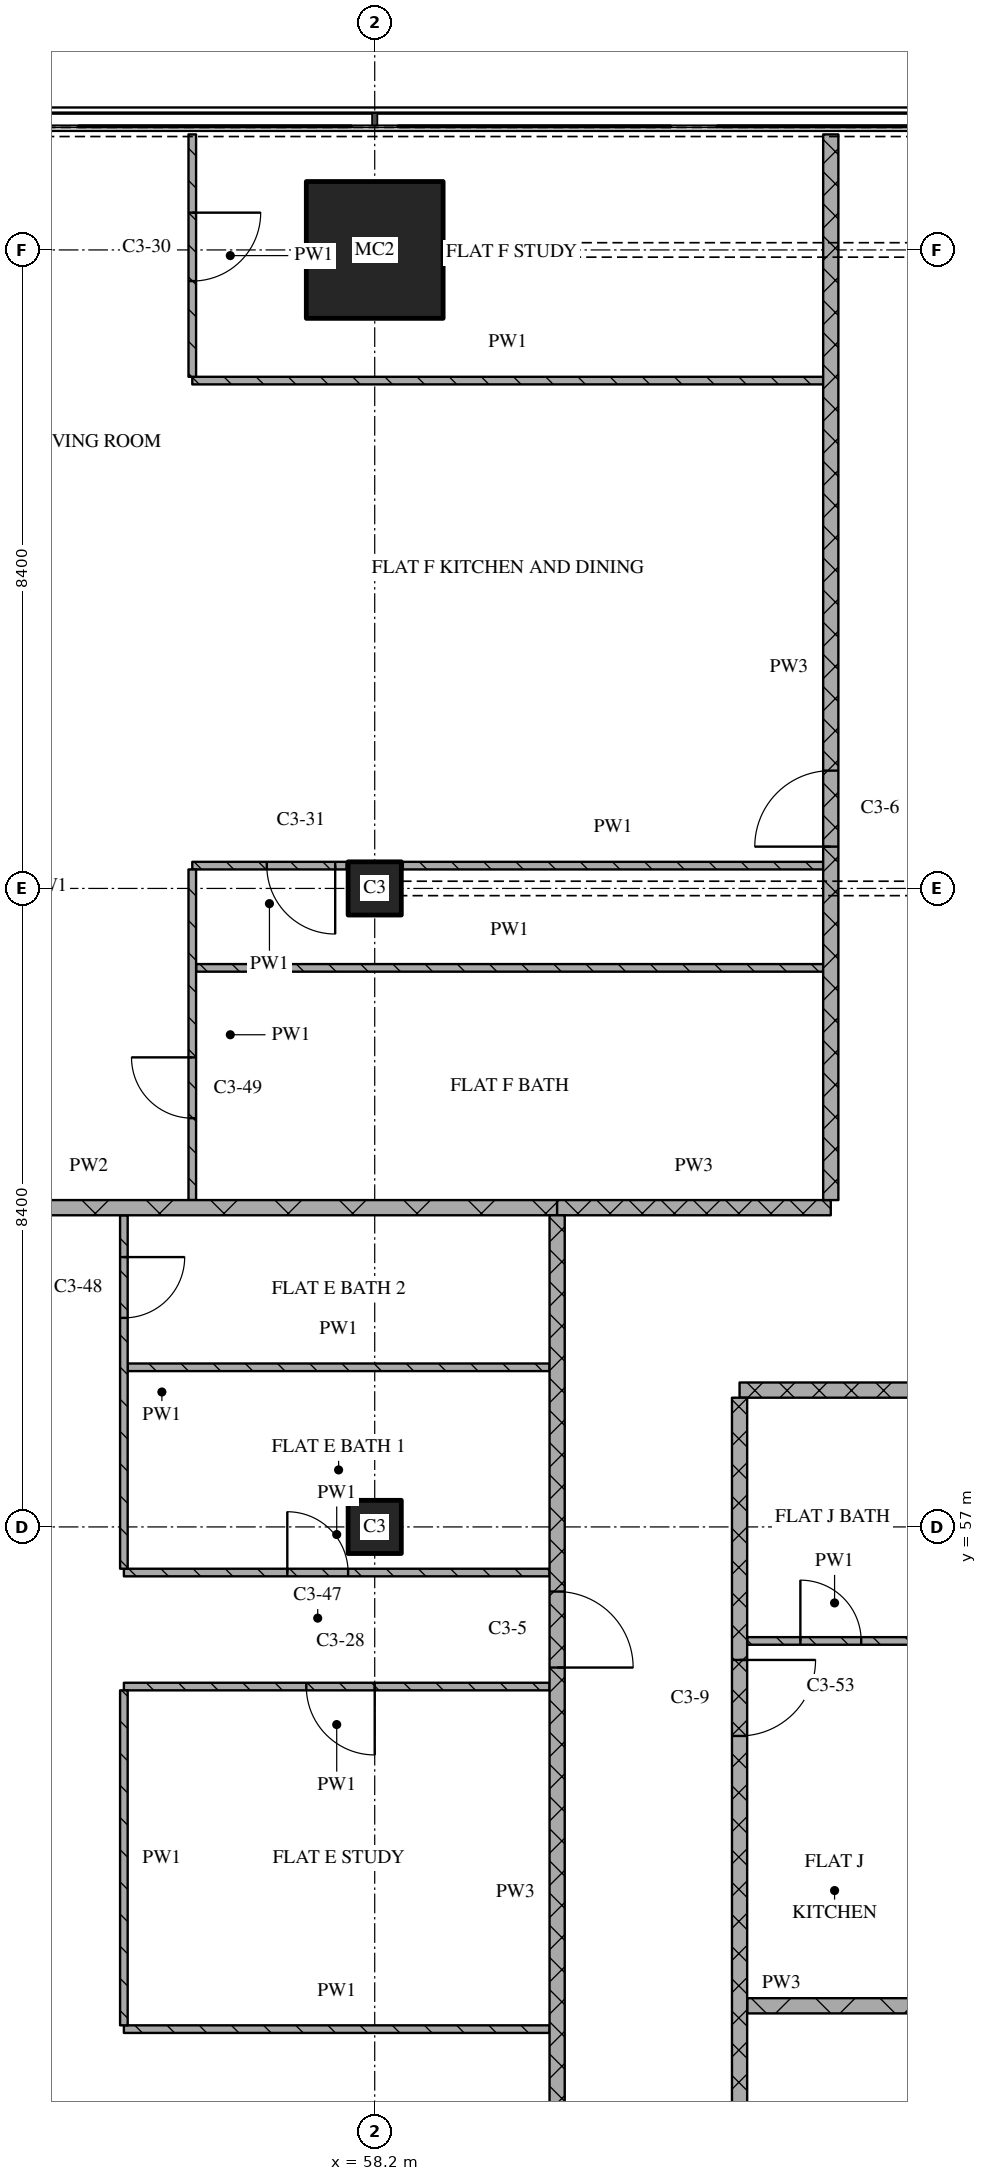
"""IFC4 building model, lengths in metres.
Left out: names, types, materials, properties, quantities, classifications, styles, units other than length and angle.
Written with IfcOpenShell. Run it as: python <this file> out.ifc"""

import sys

from ifc_helpers import new_model, si_unit, direction, frame, frame_2d, origin, origin_2d, place, context, subcontext, project, spatial, rectangle, extrude, element, fill, save


model = new_model("IFC4")
c1 = context("Model", 3, precision=1e-05, world=origin(), true_north=direction((0.0, 1.0)))
c2 = subcontext(c1, "Body", "Model", "MODEL_VIEW")
j1 = project(units=[si_unit("LENGTHUNIT", "METRE"), si_unit("PLANEANGLEUNIT", "RADIAN")], contexts=[c1])
p1 = place(None, origin())
s1 = spatial("IfcSite", under=j1, at=p1, CompositionType="ELEMENT")
p2 = place(p1, origin())
s2 = spatial("IfcBuilding", under=s1, at=p2, CompositionType="ELEMENT")
p3 = place(p2, frame((0.0, 0.0, 169.05)))
s3 = spatial("IfcBuildingStorey", under=s2, at=p3, CompositionType="ELEMENT", Elevation=169.05)
for number, where, z_axis, x_axis in (
    (1, (58.2, 57.0, 0.0), (0.0, 0.0, 1.0), (1.0, 0.0, 0.0)),
    (2, (58.2, 65.4, 0.0), (0.0, 0.0, 1.0), (1.0, 0.0, 0.0)),
):
    element("IfcColumn", number, at=place(p3, frame(where, z_axis=z_axis, x_axis=x_axis)), inside=s3, PredefinedType="COLUMN", context=c2, shape_type="SweptSolid", body=[
        extrude(rectangle(XDim=0.7, YDim=0.7, at=origin_2d()), origin(), (0.0, 0.0, 1.0), 3.6),
    ])
p4 = place(p3, frame((58.2, 73.8, 0.0), z_axis=(0.0, 0.0, 1.0), x_axis=(1.0, 0.0, 0.0)))
e3 = element("IfcColumn", 3, at=p4, inside=s3, PredefinedType="COLUMN", context=c2, shape_type="SweptSolid", body=[
    extrude(rectangle(XDim=1.8, YDim=1.8, at=origin_2d()), origin(), (0.0, 0.0, 1.0), 3.6),
])
p5 = place(p3, frame((54.9, 50.393, 0.0), z_axis=(0.0, 0.0, 1.0), x_axis=(1.0, 0.0, 0.0)))
e4 = element("IfcWall", 4, at=p5, inside=s3, PredefinedType="PARTITIONING", context=c2, shape_type="SweptSolid", body=[
    extrude(rectangle(XDim=5.6, YDim=0.1, at=frame_2d((2.8, 0.0))), origin(), (0.0, 0.0, 1.0), 3.32),
])
p6 = place(p3, frame((63.1, 50.7, 0.0), z_axis=(0.0, 0.0, 1.0), x_axis=(1.0, 0.0, 0.0)))
e5 = element("IfcWall", 5, at=p6, inside=s3, PredefinedType="PARTITIONING", context=c2, shape_type="SweptSolid", body=[
    extrude(rectangle(XDim=5.1, YDim=0.2, at=frame_2d((2.55, 0.0))), origin(), (0.0, 0.0, 1.0), 3.32),
])
p7 = place(p3, frame((60.5, 54.9, 0.0), z_axis=(0.0, 0.0, 1.0), x_axis=(-1.0, 0.0, 0.0)))
e6 = element("IfcWall", 6, at=p7, inside=s3, PredefinedType="PARTITIONING", context=c2, shape_type="SweptSolid", body=[
    extrude(rectangle(XDim=5.6, YDim=0.1, at=frame_2d((2.8, 0.0))), origin(), (0.0, 0.0, 1.0), 3.32),
])
p8 = place(p7, frame((2.3, 0.0, 0.0)))
e7 = element("IfcOpeningElement", 7, at=p8, cuts=e6, PredefinedType="OPENING", context=c2, shape_type="SweptSolid", body=[
    extrude(rectangle(XDim=0.9, YDim=2.1, at=frame_2d((0.45, 1.05))), frame((0.0, 0.06, 0.0), z_axis=(0.0, -1.0, 0.0), x_axis=(1.0, 0.0, 0.0)), (0.0, 0.0, 1.0), 0.12),
])
p9 = place(p3, frame((63.1, 55.5, 0.0), z_axis=(0.0, 0.0, 1.0), x_axis=(1.0, 0.0, 0.0)))
e8 = element("IfcWall", 8, at=p9, inside=s3, PredefinedType="PARTITIONING", context=c2, shape_type="SweptSolid", body=[
    extrude(rectangle(XDim=2.3, YDim=0.1, at=frame_2d((1.15, 0.0))), origin(), (0.0, 0.0, 1.0), 3.32),
])
p10 = place(p9, frame((0.7, 0.0, 0.0)))
e9 = element("IfcOpeningElement", 9, at=p10, cuts=e8, PredefinedType="OPENING", context=c2, shape_type="SweptSolid", body=[
    extrude(rectangle(XDim=0.8, YDim=2.1, at=frame_2d((0.4, 1.05))), frame((0.0, 0.06, 0.0), z_axis=(0.0, -1.0, 0.0), x_axis=(1.0, 0.0, 0.0)), (0.0, 0.0, 1.0), 0.12),
])
p11 = place(p3, frame((54.9, 56.4, 0.0), z_axis=(0.0, 0.0, 1.0), x_axis=(1.0, 0.0, 0.0)))
e10 = element("IfcWall", 10, at=p11, inside=s3, PredefinedType="PARTITIONING", context=c2, shape_type="SweptSolid", body=[
    extrude(rectangle(XDim=5.6, YDim=0.1, at=frame_2d((2.8, 0.0))), origin(), (0.0, 0.0, 1.0), 3.32),
])
p12 = place(p11, frame((2.15, 0.0, 0.0)))
e11 = element("IfcOpeningElement", 11, at=p12, cuts=e10, PredefinedType="OPENING", context=c2, shape_type="SweptSolid", body=[
    extrude(rectangle(XDim=0.8, YDim=2.1, at=frame_2d((0.4, 1.05))), frame((0.0, 0.06, 0.0), z_axis=(0.0, -1.0, 0.0), x_axis=(1.0, 0.0, 0.0)), (0.0, 0.0, 1.0), 0.12),
])
p13 = place(p3, frame((63.0, 58.8, 0.0), z_axis=(0.0, 0.0, 1.0), x_axis=(1.0, 0.0, 0.0)))
e12 = element("IfcWall", 12, at=p13, inside=s3, PredefinedType="PARTITIONING", context=c2, shape_type="SweptSolid", body=[
    extrude(rectangle(XDim=10.8, YDim=0.2, at=frame_2d((5.4, 0.0))), origin(), (0.0, 0.0, 1.0), 3.32),
])
p14 = place(p3, frame((54.95, 59.1, 0.0), z_axis=(0.0, 0.0, 1.0), x_axis=(1.0, 0.0, 0.0)))
e13 = element("IfcWall", 13, at=p14, inside=s3, PredefinedType="PARTITIONING", context=c2, shape_type="SweptSolid", body=[
    extrude(rectangle(XDim=5.55, YDim=0.1, at=frame_2d((2.775, 0.0))), origin(), (0.0, 0.0, 1.0), 3.32),
])
p15 = place(p3, frame((60.6, 61.2, 0.0), z_axis=(0.0, 0.0, 1.0), x_axis=(1.0, 0.0, 0.0)))
e14 = element("IfcWall", 14, at=p15, inside=s3, PredefinedType="PARTITIONING", context=c2, shape_type="SweptSolid", body=[
    extrude(rectangle(XDim=3.6, YDim=0.2, at=frame_2d((1.8, 0.0))), origin(), (0.0, 0.0, 1.0), 3.32),
])
p16 = place(p3, frame((48.28, 61.2, 0.0), z_axis=(0.0, 0.0, 1.0), x_axis=(1.0, 0.0, 0.0)))
e15 = element("IfcWall", 15, at=p16, inside=s3, PredefinedType="PARTITIONING", context=c2, shape_type="SweptSolid", body=[
    extrude(rectangle(XDim=12.32, YDim=0.2, at=frame_2d((6.16, 0.0))), origin(), (0.0, 0.0, 1.0), 3.32),
])
p17 = place(p3, frame((55.85, 64.355, 0.0), z_axis=(0.0, 0.0, 1.0), x_axis=(1.0, 0.0, 0.0)))
e16 = element("IfcWall", 16, at=p17, inside=s3, PredefinedType="PARTITIONING", context=c2, shape_type="SweptSolid", body=[
    extrude(rectangle(XDim=8.25, YDim=0.1, at=frame_2d((4.125, 0.0))), origin(), (0.0, 0.0, 1.0), 3.32),
])
p18 = place(p3, frame((57.83, 65.7, 0.0), z_axis=(0.0, 0.0, 1.0), x_axis=(-1.0, 0.0, 0.0)))
e17 = element("IfcWall", 17, at=p18, inside=s3, PredefinedType="PARTITIONING", context=c2, shape_type="SweptSolid", body=[
    extrude(rectangle(XDim=2.03, YDim=0.1, at=frame_2d((1.015, 0.0))), origin(), (0.0, 0.0, 1.0), 3.32),
])
p19 = place(p18, frame((0.15, 0.0, 0.0)))
e18 = element("IfcOpeningElement", 18, at=p19, cuts=e17, PredefinedType="OPENING", context=c2, shape_type="SweptSolid", body=[
    extrude(rectangle(XDim=0.9, YDim=2.1, at=frame_2d((0.45, 1.05))), frame((0.0, 0.06, 0.0), z_axis=(0.0, -1.0, 0.0), x_axis=(1.0, 0.0, 0.0)), (0.0, 0.0, 1.0), 0.12),
])
p20 = place(p3, frame((58.57, 65.7, 0.0), z_axis=(0.0, 0.0, 1.0), x_axis=(1.0, 0.0, 0.0)))
e19 = element("IfcWall", 19, at=p20, inside=s3, PredefinedType="PARTITIONING", context=c2, shape_type="SweptSolid", body=[
    extrude(rectangle(XDim=5.53, YDim=0.1, at=frame_2d((2.765, 0.0))), origin(), (0.0, 0.0, 1.0), 3.32),
])
p21 = place(p3, frame((55.8, 72.081, 0.0), z_axis=(0.0, 0.0, 1.0), x_axis=(1.0, 0.0, 0.0)))
e20 = element("IfcWall", 20, at=p21, inside=s3, PredefinedType="PARTITIONING", context=c2, shape_type="SweptSolid", body=[
    extrude(rectangle(XDim=8.3, YDim=0.1, at=frame_2d((4.15, 0.0))), origin(), (0.0, 0.0, 1.0), 3.32),
])
p22 = place(p3, frame((54.9, 54.85, 0.0), z_axis=(0.0, 0.0, 1.0), x_axis=(0.0, -1.0, 0.0)))
e21 = element("IfcWall", 21, at=p22, inside=s3, PredefinedType="PARTITIONING", context=c2, shape_type="SweptSolid", body=[
    extrude(rectangle(XDim=4.407, YDim=0.1, at=frame_2d((2.204, 0.0))), origin(), (0.0, 0.0, 1.0), 3.32),
])
p23 = place(p3, frame((54.9, 61.1, 0.0), z_axis=(0.0, 0.0, 1.0), x_axis=(0.0, -1.0, 0.0)))
e22 = element("IfcWall", 22, at=p23, inside=s3, PredefinedType="PARTITIONING", context=c2, shape_type="SweptSolid", body=[
    extrude(rectangle(XDim=4.65, YDim=0.1, at=frame_2d((2.325, 0.0))), origin(), (0.0, 0.0, 1.0), 3.32),
])
p24 = place(p23, frame((0.55, 0.0, 0.0)))
e23 = element("IfcOpeningElement", 23, at=p24, cuts=e22, PredefinedType="OPENING", context=c2, shape_type="SweptSolid", body=[
    extrude(rectangle(XDim=0.8, YDim=2.1, at=frame_2d((0.4, 1.05))), frame((0.0, 0.06, 0.0), z_axis=(0.0, -1.0, 0.0), x_axis=(1.0, 0.0, 0.0)), (0.0, 0.0, 1.0), 0.12),
])
p25 = place(p3, frame((55.8, 65.65, 0.0), z_axis=(0.0, 0.0, 1.0), x_axis=(0.0, -1.0, 0.0)))
e24 = element("IfcWall", 24, at=p25, inside=s3, PredefinedType="PARTITIONING", context=c2, shape_type="SweptSolid", body=[
    extrude(rectangle(XDim=4.35, YDim=0.1, at=frame_2d((2.175, 0.0))), origin(), (0.0, 0.0, 1.0), 3.32),
])
p26 = place(p25, frame((2.473, 0.0, 0.0)))
e25 = element("IfcOpeningElement", 25, at=p26, cuts=e24, PredefinedType="OPENING", context=c2, shape_type="SweptSolid", body=[
    extrude(rectangle(XDim=0.8, YDim=2.1, at=frame_2d((0.4, 1.05))), frame((0.0, 0.06, 0.0), z_axis=(0.0, -1.0, 0.0), x_axis=(1.0, 0.0, 0.0)), (0.0, 0.0, 1.0), 0.12),
])
p27 = place(p3, frame((55.8, 75.32, 0.0), z_axis=(0.0, 0.0, 1.0), x_axis=(0.0, -1.0, 0.0)))
e26 = element("IfcWall", 26, at=p27, inside=s3, PredefinedType="PARTITIONING", context=c2, shape_type="SweptSolid", body=[
    extrude(rectangle(XDim=3.189, YDim=0.1, at=frame_2d((1.594, 0.0))), origin(), (0.0, 0.0, 1.0), 3.32),
])
p28 = place(p27, frame((1.03, 0.0, 0.0)))
e27 = element("IfcOpeningElement", 27, at=p28, cuts=e26, PredefinedType="OPENING", context=c2, shape_type="SweptSolid", body=[
    extrude(rectangle(XDim=0.9, YDim=2.1, at=frame_2d((0.45, 1.05))), frame((0.0, 0.06, 0.0), z_axis=(0.0, -1.0, 0.0), x_axis=(1.0, 0.0, 0.0)), (0.0, 0.0, 1.0), 0.12),
])
p29 = place(p3, frame((60.6, 43.3, 0.0), z_axis=(0.0, 0.0, 1.0), x_axis=(0.0, 1.0, 0.0)))
e28 = element("IfcWall", 28, at=p29, inside=s3, PredefinedType="PARTITIONING", context=c2, shape_type="SweptSolid", body=[
    extrude(rectangle(XDim=17.8, YDim=0.2, at=frame_2d((8.9, 0.0))), origin(), (0.0, 0.0, 1.0), 3.32),
])
p30 = place(p29, frame((11.85, 0.0, 0.0)))
e29 = element("IfcOpeningElement", 29, at=p30, cuts=e28, PredefinedType="OPENING", context=c2, shape_type="SweptSolid", body=[
    extrude(rectangle(XDim=1.0, YDim=2.1, at=frame_2d((0.5, 1.05))), frame((0.0, 0.11, 0.0), z_axis=(0.0, -1.0, 0.0), x_axis=(1.0, 0.0, 0.0)), (0.0, 0.0, 1.0), 0.22),
])
p31 = place(p3, frame((63.0, 58.7, 0.0), z_axis=(0.0, 0.0, 1.0), x_axis=(0.0, -1.0, 0.0)))
e30 = element("IfcWall", 30, at=p31, inside=s3, PredefinedType="PARTITIONING", context=c2, shape_type="SweptSolid", body=[
    extrude(rectangle(XDim=15.4, YDim=0.2, at=frame_2d((7.7, 0.0))), origin(), (0.0, 0.0, 1.0), 3.32),
])
p32 = place(p31, frame((3.45, 0.0, 0.0)))
e31 = element("IfcOpeningElement", 31, at=p32, cuts=e30, PredefinedType="OPENING", context=c2, shape_type="SweptSolid", body=[
    extrude(rectangle(XDim=1.0, YDim=2.1, at=frame_2d((0.5, 1.05))), frame((0.0, 0.11, 0.0), z_axis=(0.0, -1.0, 0.0), x_axis=(1.0, 0.0, 0.0)), (0.0, 0.0, 1.0), 0.22),
])
p33 = place(p31, frame((11.25, 0.0, 0.0)))
e32 = element("IfcOpeningElement", 32, at=p33, cuts=e30, PredefinedType="OPENING", context=c2, shape_type="SweptSolid", body=[
    extrude(rectangle(XDim=0.9, YDim=2.1, at=frame_2d((0.45, 1.05))), frame((0.0, 0.11, 0.0), z_axis=(0.0, -1.0, 0.0), x_axis=(1.0, 0.0, 0.0)), (0.0, 0.0, 1.0), 0.22),
])
p34 = place(p3, frame((64.2, 61.3, 0.0), z_axis=(0.0, 0.0, 1.0), x_axis=(0.0, 1.0, 0.0)))
e33 = element("IfcWall", 33, at=p34, inside=s3, PredefinedType="PARTITIONING", context=c2, shape_type="SweptSolid", body=[
    extrude(rectangle(XDim=14.02, YDim=0.2, at=frame_2d((7.01, 0.0))), origin(), (0.0, 0.0, 1.0), 3.32),
])
p35 = place(p34, frame((4.65, 0.0, 0.0)))
e34 = element("IfcOpeningElement", 34, at=p35, cuts=e33, PredefinedType="OPENING", context=c2, shape_type="SweptSolid", body=[
    extrude(rectangle(XDim=1.0, YDim=2.1, at=frame_2d((0.5, 1.05))), frame((0.0, 0.11, 0.0), z_axis=(0.0, -1.0, 0.0), x_axis=(1.0, 0.0, 0.0)), (0.0, 0.0, 1.0), 0.22),
])
p36 = place(p8, origin())
e35 = element("IfcDoor", 35, at=p36, inside=s3, OperationType="SINGLE_SWING_LEFT", PredefinedType="DOOR", context=c2, shape_type="SweptSolid", body=[
    extrude(rectangle(XDim=0.9, YDim=2.1, at=frame_2d((0.45, 1.05))), frame((0.0, 0.025, 0.0), z_axis=(0.0, -1.0, 0.0), x_axis=(1.0, 0.0, 0.0)), (0.0, 0.0, 1.0), 0.05),
])
fill(e7, e35)
p37 = place(p10, origin())
e36 = element("IfcDoor", 36, at=p37, inside=s3, OperationType="SINGLE_SWING_LEFT", PredefinedType="DOOR", context=c2, shape_type="SweptSolid", body=[
    extrude(rectangle(XDim=0.8, YDim=2.1, at=frame_2d((0.4, 1.05))), frame((0.0, 0.025, 0.0), z_axis=(0.0, -1.0, 0.0), x_axis=(1.0, 0.0, 0.0)), (0.0, 0.0, 1.0), 0.05),
])
fill(e9, e36)
p38 = place(p12, origin())
e37 = element("IfcDoor", 37, at=p38, inside=s3, OperationType="SINGLE_SWING_LEFT", PredefinedType="DOOR", context=c2, shape_type="SweptSolid", body=[
    extrude(rectangle(XDim=0.8, YDim=2.1, at=frame_2d((0.4, 1.05))), frame((0.0, 0.025, 0.0), z_axis=(0.0, -1.0, 0.0), x_axis=(1.0, 0.0, 0.0)), (0.0, 0.0, 1.0), 0.05),
])
fill(e11, e37)
p39 = place(p19, origin())
e38 = element("IfcDoor", 38, at=p39, inside=s3, OperationType="SINGLE_SWING_LEFT", PredefinedType="DOOR", context=c2, shape_type="SweptSolid", body=[
    extrude(rectangle(XDim=0.9, YDim=2.1, at=frame_2d((0.45, 1.05))), frame((0.0, 0.025, 0.0), z_axis=(0.0, -1.0, 0.0), x_axis=(1.0, 0.0, 0.0)), (0.0, 0.0, 1.0), 0.05),
])
fill(e18, e38)
p40 = place(p24, origin())
e39 = element("IfcDoor", 39, at=p40, inside=s3, OperationType="SINGLE_SWING_LEFT", PredefinedType="DOOR", context=c2, shape_type="SweptSolid", body=[
    extrude(rectangle(XDim=0.8, YDim=2.1, at=frame_2d((0.4, 1.05))), frame((0.0, 0.025, 0.0), z_axis=(0.0, -1.0, 0.0), x_axis=(1.0, 0.0, 0.0)), (0.0, 0.0, 1.0), 0.05),
])
fill(e23, e39)
p41 = place(p26, origin())
e40 = element("IfcDoor", 40, at=p41, inside=s3, OperationType="SINGLE_SWING_RIGHT", PredefinedType="DOOR", context=c2, shape_type="SweptSolid", body=[
    extrude(rectangle(XDim=0.8, YDim=2.1, at=frame_2d((0.4, 1.05))), frame((0.0, 0.025, 0.0), z_axis=(0.0, -1.0, 0.0), x_axis=(1.0, 0.0, 0.0)), (0.0, 0.0, 1.0), 0.05),
])
fill(e25, e40)
p42 = place(p28, origin())
e41 = element("IfcDoor", 41, at=p42, inside=s3, OperationType="SINGLE_SWING_LEFT", PredefinedType="DOOR", context=c2, shape_type="SweptSolid", body=[
    extrude(rectangle(XDim=0.9, YDim=2.1, at=frame_2d((0.45, 1.05))), frame((0.0, 0.025, 0.0), z_axis=(0.0, -1.0, 0.0), x_axis=(1.0, 0.0, 0.0)), (0.0, 0.0, 1.0), 0.05),
])
fill(e27, e41)
p43 = place(p30, origin())
e42 = element("IfcDoor", 42, at=p43, inside=s3, OperationType="SINGLE_SWING_RIGHT", PredefinedType="DOOR", context=c2, shape_type="SweptSolid", body=[
    extrude(rectangle(XDim=1.0, YDim=2.1, at=frame_2d((0.5, 1.05))), frame((0.0, 0.025, 0.0), z_axis=(0.0, -1.0, 0.0), x_axis=(1.0, 0.0, 0.0)), (0.0, 0.0, 1.0), 0.05),
])
fill(e29, e42)
p44 = place(p32, origin())
e43 = element("IfcDoor", 43, at=p44, inside=s3, OperationType="SINGLE_SWING_LEFT", PredefinedType="DOOR", context=c2, shape_type="SweptSolid", body=[
    extrude(rectangle(XDim=1.0, YDim=2.1, at=frame_2d((0.5, 1.05))), frame((0.0, 0.025, 0.0), z_axis=(0.0, -1.0, 0.0), x_axis=(1.0, 0.0, 0.0)), (0.0, 0.0, 1.0), 0.05),
])
fill(e31, e43)
p45 = place(p35, origin())
e44 = element("IfcDoor", 44, at=p45, inside=s3, OperationType="SINGLE_SWING_LEFT", PredefinedType="DOOR", context=c2, shape_type="SweptSolid", body=[
    extrude(rectangle(XDim=1.0, YDim=2.1, at=frame_2d((0.5, 1.05))), frame((0.0, 0.025, 0.0), z_axis=(0.0, -1.0, 0.0), x_axis=(1.0, 0.0, 0.0)), (0.0, 0.0, 1.0), 0.05),
])
fill(e34, e44)
save(model, sys.argv[1])
